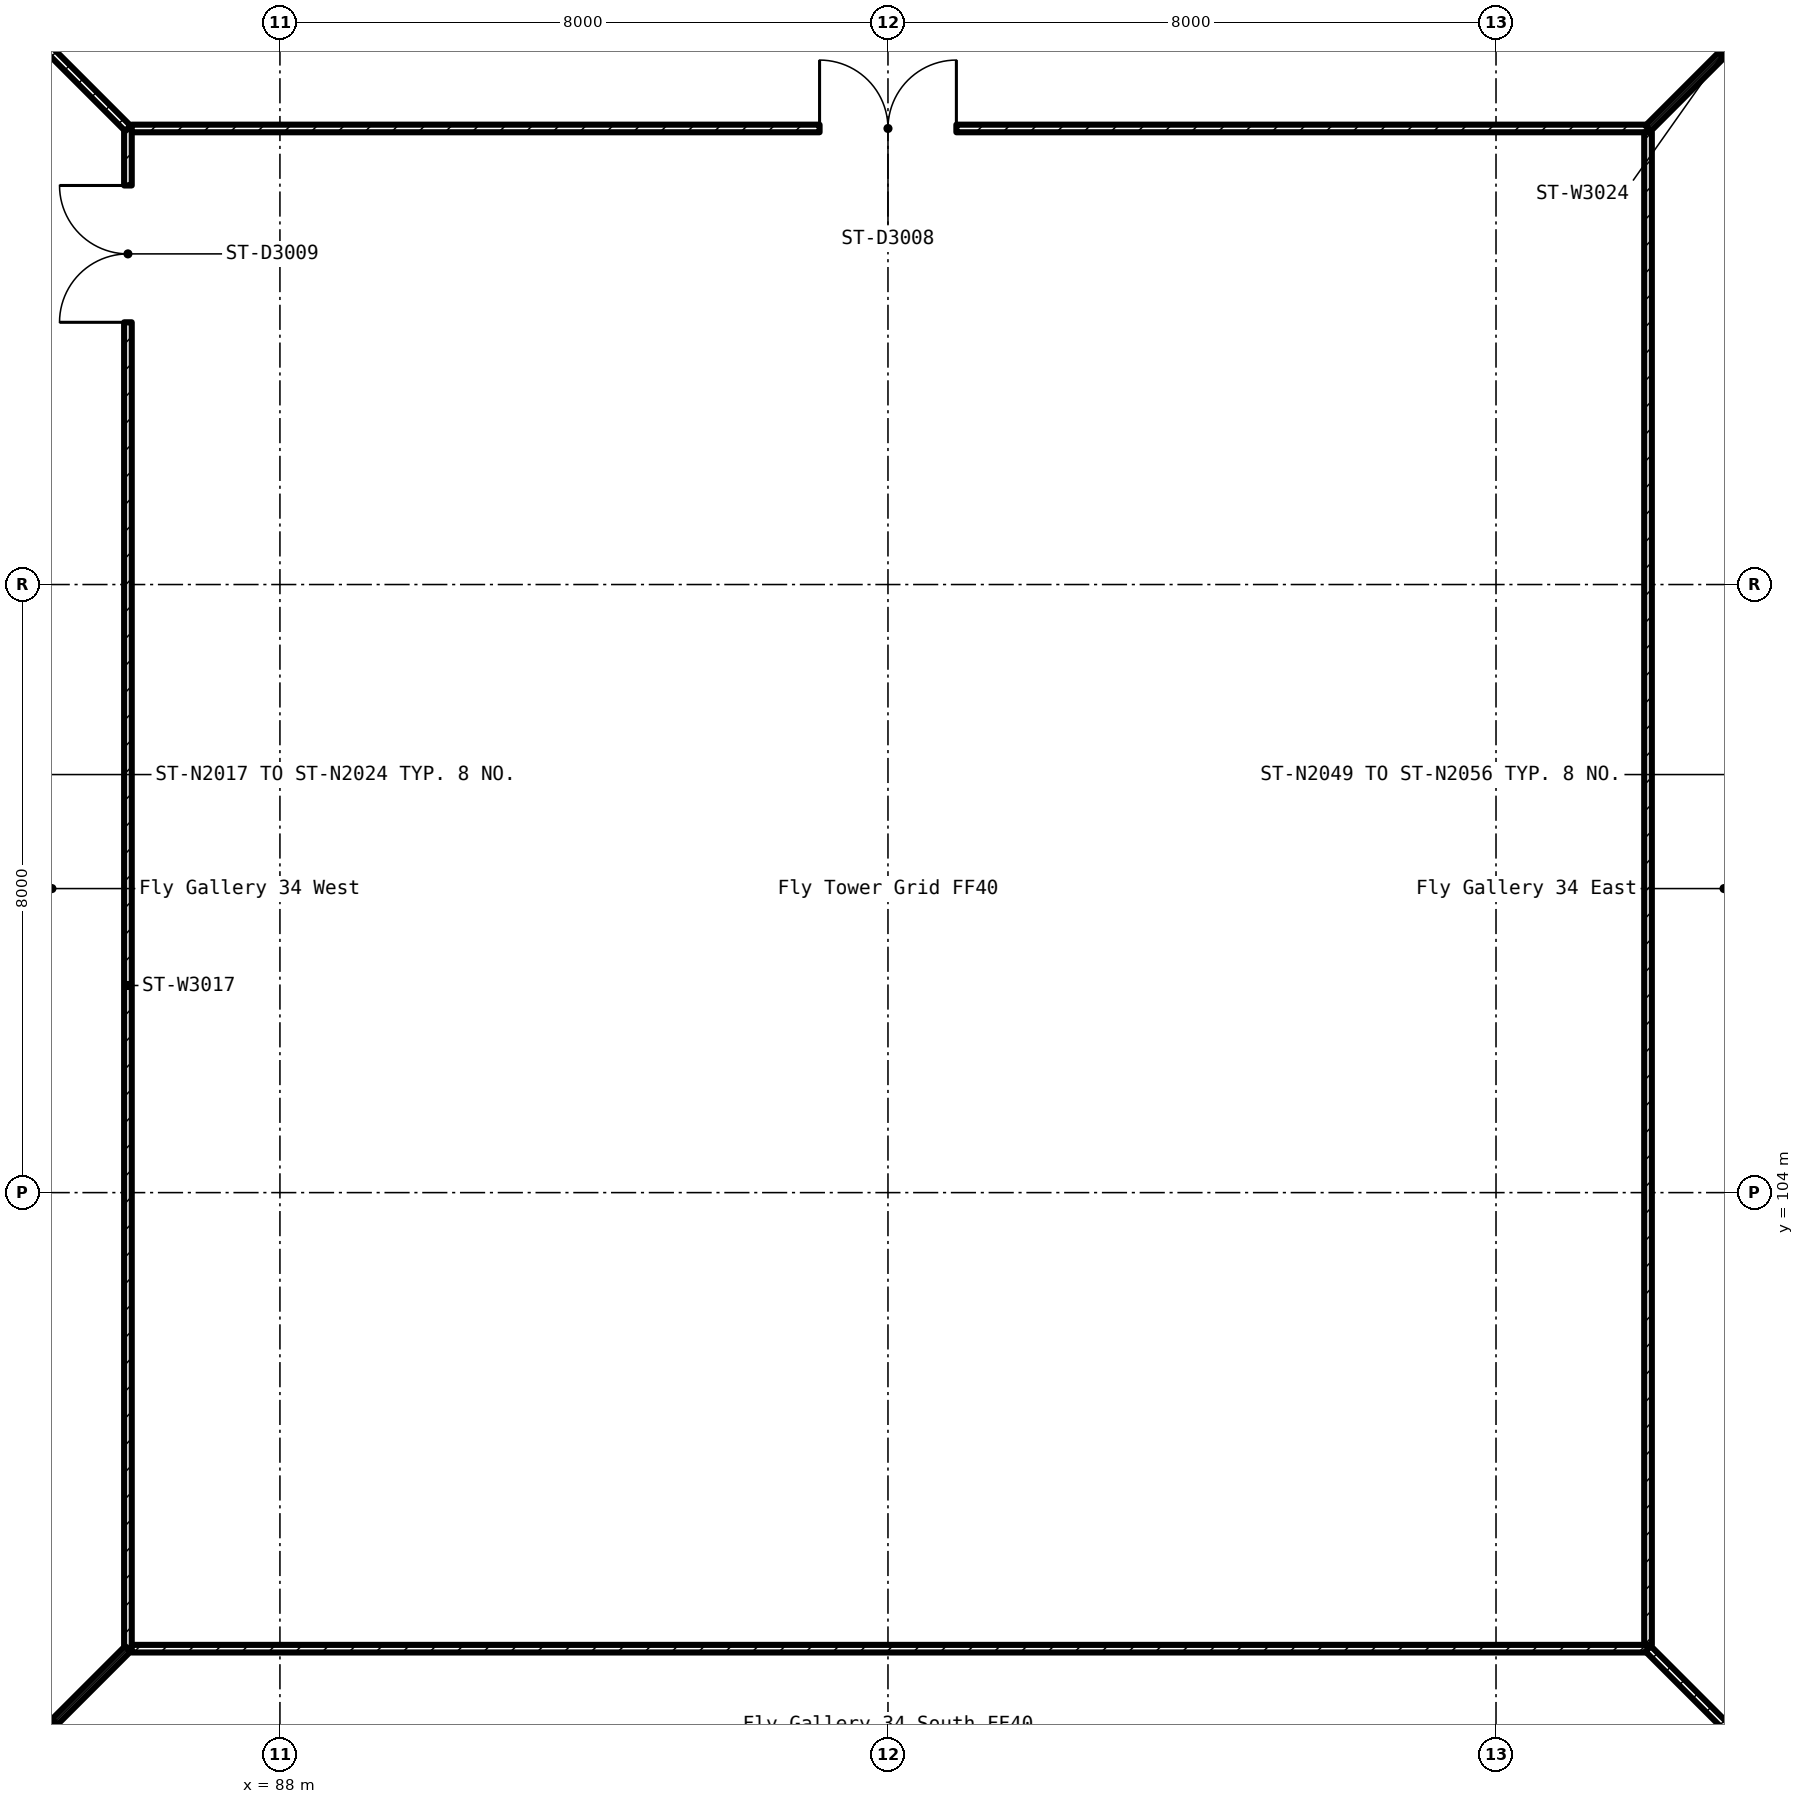
"""IFC4 building model, lengths in metres.
Left out: names, types, materials, properties, quantities, classifications, styles, units other than length and angle.
Written with IfcOpenShell. Run it as: python <this file> out.ifc"""

import sys

from ifc_helpers import new_model, si_unit, direction, frame, frame_2d, origin, place, context, subcontext, project, spatial, rectangle, extrude, element, fill, save


model = new_model("IFC4")
c1 = context("Model", 3, precision=1e-05, world=origin(), true_north=direction((0.0, 1.0)))
c2 = subcontext(c1, "Body", "Model", "MODEL_VIEW")
j1 = project(units=[si_unit("LENGTHUNIT", "METRE"), si_unit("PLANEANGLEUNIT", "RADIAN")], contexts=[c1])
p1 = place(None, origin())
s1 = spatial("IfcSite", under=j1, at=p1, CompositionType="ELEMENT")
p2 = place(p1, origin())
s2 = spatial("IfcBuilding", under=s1, at=p2, CompositionType="ELEMENT")
p3 = place(p2, frame((0.0, 0.0, 34.0)))
s3 = spatial("IfcBuildingStorey", under=s2, at=p3, CompositionType="ELEMENT", Elevation=34.0)
p4 = place(p3, frame((86.0, 98.0, 0.0), z_axis=(0.0, 0.0, 1.0), x_axis=(0.0, 1.0, 0.0)))
e1 = element("IfcWall", 1, at=p4, inside=s3, PredefinedType="PARTITIONING", context=c2, shape_type="SweptSolid", body=[
    extrude(rectangle(XDim=20.0, YDim=0.1, at=frame_2d((10.0, 0.0))), origin(), (0.0, 0.0, 1.0), 11.1),
])
p5 = place(p4, frame((17.45, 0.0, 0.0)))
e2 = element("IfcOpeningElement", 2, at=p5, cuts=e1, PredefinedType="OPENING", context=c2, shape_type="SweptSolid", body=[
    extrude(rectangle(XDim=1.8, YDim=2.1, at=frame_2d((0.9, 1.05))), frame((0.0, 0.062, 0.0), z_axis=(0.0, -1.0, 0.0), x_axis=(1.0, 0.0, 0.0)), (0.0, 0.0, 1.0), 0.124),
])
p6 = place(p3, frame((86.05, 118.0, 0.0), z_axis=(0.0, 0.0, 1.0), x_axis=(1.0, 0.0, 0.0)))
e3 = element("IfcWall", 3, at=p6, inside=s3, PredefinedType="PARTITIONING", context=c2, shape_type="SweptSolid", body=[
    extrude(rectangle(XDim=19.95, YDim=0.1, at=frame_2d((9.975, 0.0))), origin(), (0.0, 0.0, 1.0), 11.1),
])
p7 = place(p6, frame((9.05, 0.0, 0.0)))
e4 = element("IfcOpeningElement", 4, at=p7, cuts=e3, PredefinedType="OPENING", context=c2, shape_type="SweptSolid", body=[
    extrude(rectangle(XDim=1.8, YDim=2.1, at=frame_2d((0.9, 1.05))), frame((0.0, 0.062, 0.0), z_axis=(0.0, -1.0, 0.0), x_axis=(1.0, 0.0, 0.0)), (0.0, 0.0, 1.0), 0.124),
])
p8 = place(p3, frame((106.0, 98.0, 0.0), z_axis=(0.0, 0.0, 1.0), x_axis=(-1.0, 0.0, 0.0)))
e5 = element("IfcWall", 5, at=p8, inside=s3, PredefinedType="PARTITIONING", context=c2, shape_type="SweptSolid", body=[
    extrude(rectangle(XDim=19.95, YDim=0.1, at=frame_2d((9.975, 0.0))), origin(), (0.0, 0.0, 1.0), 11.1),
])
p9 = place(p3, frame((106.0, 117.95, 0.0), z_axis=(0.0, 0.0, 1.0), x_axis=(0.0, -1.0, 0.0)))
e6 = element("IfcWall", 6, at=p9, inside=s3, PredefinedType="PARTITIONING", context=c2, shape_type="SweptSolid", body=[
    extrude(rectangle(XDim=19.9, YDim=0.1, at=frame_2d((9.95, 0.0))), origin(), (0.0, 0.0, 1.0), 11.1),
])
for number, where, z_axis, x_axis in (
    (7, (85.999, 97.999, 0.0), (0.0, 0.0, 1.0), (-0.707, -0.707, 0.0)),
    (8, (84.05, 119.95, 0.0), (0.0, 0.0, 1.0), (0.707, -0.707, 0.0)),
    (9, (107.95, 96.05, 0.0), (0.0, 0.0, 1.0), (-0.707, 0.707, 0.0)),
    (10, (106.001, 118.001, 0.0), (0.0, 0.0, 1.0), (0.707, 0.707, 0.0)),
):
    element("IfcWall", number, at=place(p3, frame(where, z_axis=z_axis, x_axis=x_axis)), inside=s3, PredefinedType="PARTITIONING", context=c2, shape_type="SweptSolid", body=[
        extrude(rectangle(XDim=2.756, YDim=0.1, at=frame_2d((1.378, 0.0))), origin(), (0.0, 0.0, 1.0), 11.1),
    ])
p10 = place(p7, origin())
e11 = element("IfcDoor", 11, at=p10, inside=s3, OperationType="DOUBLE_DOOR_SINGLE_SWING", PredefinedType="DOOR", context=c2, shape_type="SweptSolid", body=[
    extrude(rectangle(XDim=1.8, YDim=2.1, at=frame_2d((0.9, 1.05))), frame((0.0, 0.025, 0.0), z_axis=(0.0, -1.0, 0.0), x_axis=(1.0, 0.0, 0.0)), (0.0, 0.0, 1.0), 0.05),
])
fill(e4, e11)
p11 = place(p5, origin())
e12 = element("IfcDoor", 12, at=p11, inside=s3, OperationType="DOUBLE_DOOR_SINGLE_SWING", PredefinedType="DOOR", context=c2, shape_type="SweptSolid", body=[
    extrude(rectangle(XDim=1.8, YDim=2.1, at=frame_2d((0.9, 1.05))), frame((0.0, 0.025, 0.0), z_axis=(0.0, -1.0, 0.0), x_axis=(1.0, 0.0, 0.0)), (0.0, 0.0, 1.0), 0.05),
])
fill(e2, e12)
save(model, sys.argv[1])
